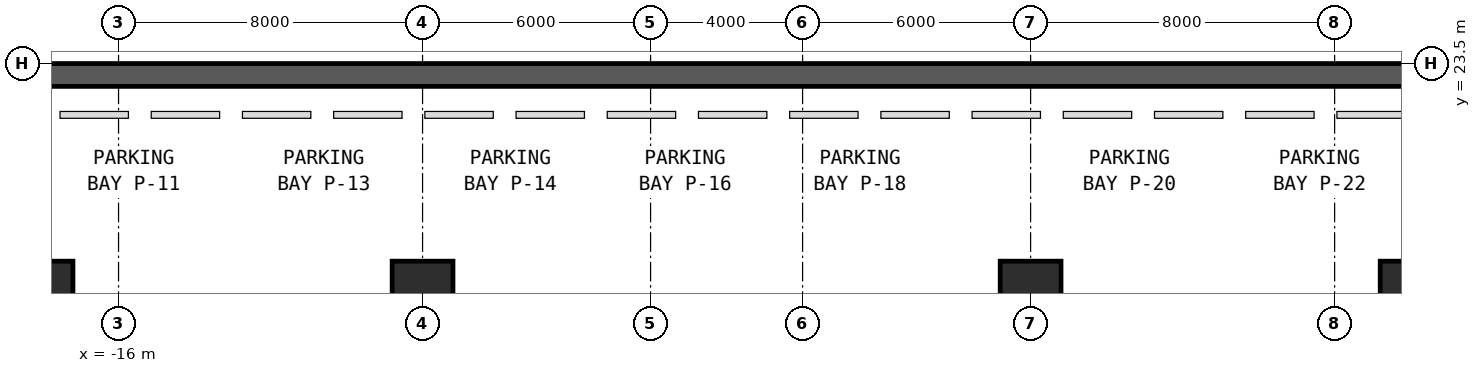
"""IFC4 building model, lengths in metres.
Left out: names, types, materials, properties, quantities, classifications, styles, units other than length and angle.
Written with IfcOpenShell. Run it as: python <this file> out.ifc"""

import sys

from ifc_helpers import new_model, si_unit, direction, frame, frame_2d, origin, origin_2d, place, context, subcontext, project, spatial, rectangle, extrude, element, save


model = new_model("IFC4")
c1 = context("Model", 3, precision=1e-05, world=origin(), true_north=direction((0.0, 1.0)))
c2 = subcontext(c1, "Body", "Model", "MODEL_VIEW")
j1 = project(units=[si_unit("LENGTHUNIT", "METRE"), si_unit("PLANEANGLEUNIT", "RADIAN")], contexts=[c1])
p1 = place(None, origin())
s1 = spatial("IfcSite", under=j1, at=p1, CompositionType="ELEMENT")
p2 = place(p1, origin())
s2 = spatial("IfcBuilding", under=s1, at=p2, CompositionType="ELEMENT")
p3 = place(p2, frame((0.0, 0.0, -10.0)))
s3 = spatial("IfcBuildingStorey", under=s2, at=p3, CompositionType="ELEMENT", Elevation=-10.0)
p4 = place(p3, frame((-34.0, 23.2, 0.0), z_axis=(0.0, 0.0, 1.0), x_axis=(1.0, 0.0, 0.0)))
e1 = element("IfcWall", 1, at=p4, inside=s3, PredefinedType="SOLIDWALL", context=c2, shape_type="SweptSolid", body=[
    extrude(rectangle(XDim=68.0, YDim=0.6, at=frame_2d((34.0, 0.0))), origin(), (0.0, 0.0, 1.0), 4.48),
])
for number, where, z_axis, x_axis in (
    (2, (-18.0, 17.5, 0.0), (0.0, 0.0, 1.0), (1.0, 0.0, 0.0)),
    (3, (-8.0, 17.5, 0.0), (0.0, 0.0, 1.0), (1.0, 0.0, 0.0)),
    (4, (8.0, 17.5, 0.0), (0.0, 0.0, 1.0), (1.0, 0.0, 0.0)),
    (5, (18.0, 17.5, 0.0), (0.0, 0.0, 1.0), (1.0, 0.0, 0.0)),
):
    element("IfcColumn", number, at=place(p3, frame(where, z_axis=z_axis, x_axis=x_axis)), inside=s3, PredefinedType="COLUMN", context=c2, shape_type="SweptSolid", body=[
        extrude(rectangle(XDim=1.6, YDim=1.6, at=origin_2d()), origin(), (0.0, 0.0, 1.0), 4.8),
    ])
save(model, sys.argv[1])
